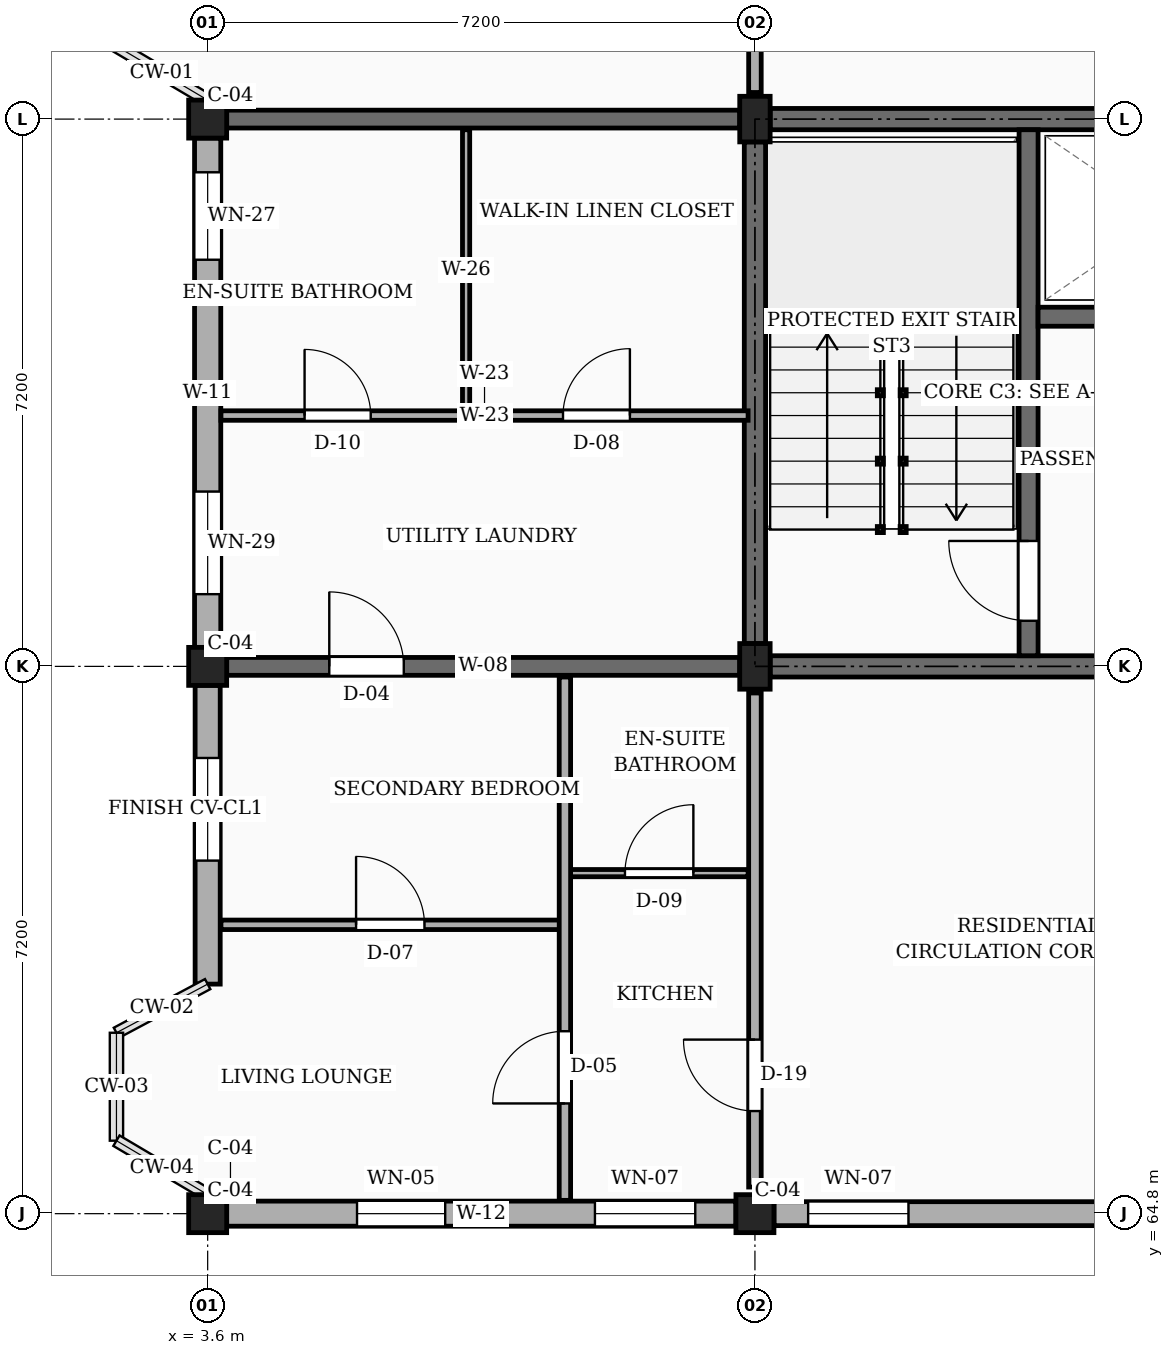
"""IFC4 building model, lengths in metres.
Left out: names, types, materials, properties, quantities, classifications, styles, units other than length and angle.
Written with IfcOpenShell. Run it as: python <this file> out.ifc"""

import sys

from ifc_helpers import new_model, si_unit, direction, frame, frame_2d, origin, origin_2d, place, context, subcontext, project, spatial, rectangle, extrude, element, fill, save


model = new_model("IFC4")
c1 = context("Model", 3, precision=1e-05, world=origin(), true_north=direction((0.0, 1.0)))
c2 = subcontext(c1, "Body", "Model", "MODEL_VIEW")
j1 = project(units=[si_unit("LENGTHUNIT", "METRE"), si_unit("PLANEANGLEUNIT", "RADIAN")], contexts=[c1])
p1 = place(None, origin())
s1 = spatial("IfcSite", under=j1, at=p1, CompositionType="ELEMENT")
p2 = place(p1, origin())
s2 = spatial("IfcBuilding", under=s1, at=p2, CompositionType="ELEMENT")
p3 = place(p2, frame((0.0, 0.0, 23.4)))
s3 = spatial("IfcBuildingStorey", under=s2, at=p3, CompositionType="ELEMENT", Elevation=23.4)
for number, where, z_axis, x_axis in (
    (1, (3.6, 64.8, 0.0), (0.0, 0.0, 1.0), (1.0, 0.0, 0.0)),
    (2, (3.6, 72.0, 0.0), (0.0, 0.0, 1.0), (1.0, 0.0, 0.0)),
    (3, (3.6, 79.2, 0.0), (0.0, 0.0, 1.0), (1.0, 0.0, 0.0)),
    (4, (10.8, 64.8, 0.0), (0.0, 0.0, 1.0), (1.0, 0.0, 0.0)),
):
    element("IfcColumn", number, at=place(p3, frame(where, z_axis=z_axis, x_axis=x_axis)), inside=s3, PredefinedType="COLUMN", context=c2, shape_type="SweptSolid", body=[
        extrude(rectangle(XDim=0.5, YDim=0.5, at=origin_2d()), origin(), (0.0, 0.0, 1.0), 3.15),
    ])
for number, where, z_axis, x_axis in (
    (5, (10.8, 72.0, 0.0), (0.0, 0.0, 1.0), (1.0, 0.0, 0.0)),
    (6, (10.8, 79.2, 0.0), (0.0, 0.0, 1.0), (1.0, 0.0, 0.0)),
):
    element("IfcColumn", number, at=place(p3, frame(where, z_axis=z_axis, x_axis=x_axis)), inside=s3, PredefinedType="COLUMN", context=c2, shape_type="SweptSolid", body=[
        extrude(rectangle(XDim=0.4, YDim=0.6, at=origin_2d()), origin(), (0.0, 0.0, 1.0), 3.15),
    ])
p4 = place(p3, frame((3.85, 72.0, 0.0), z_axis=(0.0, 0.0, 1.0), x_axis=(1.0, 0.0, 0.0)))
e7 = element("IfcWall", 7, at=p4, inside=s3, PredefinedType="SOLIDWALL", context=c2, shape_type="SweptSolid", body=[
    extrude(rectangle(XDim=6.75, YDim=0.235, at=frame_2d((3.375, 0.0))), origin(), (0.0, 0.0, 1.0), 2.21),
])
p5 = place(p4, frame((1.35, 0.0, 0.0)))
e8 = element("IfcOpeningElement", 8, at=p5, cuts=e7, PredefinedType="OPENING", context=c2, shape_type="SweptSolid", body=[
    extrude(rectangle(XDim=0.98, YDim=2.12, at=frame_2d((0.49, 1.06))), frame((0.0, 0.127, 0.0), z_axis=(0.0, -1.0, 0.0), x_axis=(1.0, 0.0, 0.0)), (0.0, 0.0, 1.0), 0.255),
])
p6 = place(p3, frame((3.85, 79.2, 0.0), z_axis=(0.0, 0.0, 1.0), x_axis=(1.0, 0.0, 0.0)))
e9 = element("IfcWall", 9, at=p6, inside=s3, PredefinedType="SOLIDWALL", context=c2, shape_type="SweptSolid", body=[
    extrude(rectangle(XDim=6.75, YDim=0.235, at=frame_2d((3.375, 0.0))), origin(), (0.0, 0.0, 1.0), 2.21),
])
p7 = place(p3, frame((3.85, 64.8, 0.0), z_axis=(0.0, 0.0, 1.0), x_axis=(1.0, 0.0, 0.0)))
e10 = element("IfcWall", 10, at=p7, inside=s3, PredefinedType="SOLIDWALL", context=c2, shape_type="SweptSolid", body=[
    extrude(rectangle(XDim=6.7, YDim=0.33, at=frame_2d((3.35, 0.0))), origin(), (0.0, 0.0, 1.0), 2.48),
])
p8 = place(p7, frame((1.715, 0.0, 0.78)))
e11 = element("IfcOpeningElement", 11, at=p8, cuts=e10, PredefinedType="OPENING", context=c2, shape_type="SweptSolid", body=[
    extrude(rectangle(XDim=1.16, YDim=1.15, at=frame_2d((0.58, 0.575))), frame((0.0, 0.175, 0.0), z_axis=(0.0, -1.0, 0.0), x_axis=(1.0, 0.0, 0.0)), (0.0, 0.0, 1.0), 0.35),
])
p9 = place(p7, frame((4.845, 0.0, 0.78)))
e12 = element("IfcOpeningElement", 12, at=p9, cuts=e10, PredefinedType="OPENING", context=c2, shape_type="SweptSolid", body=[
    extrude(rectangle(XDim=1.32, YDim=1.15, at=frame_2d((0.66, 0.575))), frame((0.0, 0.175, 0.0), z_axis=(0.0, -1.0, 0.0), x_axis=(1.0, 0.0, 0.0)), (0.0, 0.0, 1.0), 0.35),
])
p10 = place(p3, frame((11.05, 64.8, 0.0), z_axis=(0.0, 0.0, 1.0), x_axis=(1.0, 0.0, 0.0)))
e13 = element("IfcWall", 13, at=p10, inside=s3, PredefinedType="SOLIDWALL", context=c2, shape_type="SweptSolid", body=[
    extrude(rectangle(XDim=6.7, YDim=0.315, at=frame_2d((3.35, 0.0))), origin(), (0.0, 0.0, 1.0), 2.48),
])
p11 = place(p10, frame((0.45, 0.0, 0.78)))
e14 = element("IfcOpeningElement", 14, at=p11, cuts=e13, PredefinedType="OPENING", context=c2, shape_type="SweptSolid", body=[
    extrude(rectangle(XDim=1.32, YDim=1.15, at=frame_2d((0.66, 0.575))), frame((0.0, 0.167, 0.0), z_axis=(0.0, -1.0, 0.0), x_axis=(1.0, 0.0, 0.0)), (0.0, 0.0, 1.0), 0.335),
])
p12 = place(p10, frame((4.65, 0.0, 0.78)))
e15 = element("IfcOpeningElement", 15, at=p12, cuts=e13, PredefinedType="OPENING", context=c2, shape_type="SweptSolid", body=[
    extrude(rectangle(XDim=0.88, YDim=1.26, at=frame_2d((0.44, 0.63))), frame((0.0, 0.167, 0.0), z_axis=(0.0, -1.0, 0.0), x_axis=(1.0, 0.0, 0.0)), (0.0, 0.0, 1.0), 0.335),
])
p13 = place(p3, frame((3.6, 78.95, 0.0), z_axis=(0.0, 0.0, 1.0), x_axis=(0.0, -1.0, 0.0)))
e16 = element("IfcWall", 16, at=p13, inside=s3, PredefinedType="SOLIDWALL", context=c2, shape_type="SweptSolid", body=[
    extrude(rectangle(XDim=6.7, YDim=0.345, at=frame_2d((3.35, 0.0))), origin(), (0.0, 0.0, 1.0), 2.48),
])
p14 = place(p13, frame((0.45, 0.0, 0.78)))
e17 = element("IfcOpeningElement", 17, at=p14, cuts=e16, PredefinedType="OPENING", context=c2, shape_type="SweptSolid", body=[
    extrude(rectangle(XDim=1.15, YDim=1.44, at=frame_2d((0.575, 0.72))), frame((0.0, 0.183, 0.0), z_axis=(0.0, -1.0, 0.0), x_axis=(1.0, 0.0, 0.0)), (0.0, 0.0, 1.0), 0.365),
])
p15 = place(p13, frame((4.65, 0.0, 0.78)))
e18 = element("IfcOpeningElement", 18, at=p15, cuts=e16, PredefinedType="OPENING", context=c2, shape_type="SweptSolid", body=[
    extrude(rectangle(XDim=1.35, YDim=1.44, at=frame_2d((0.675, 0.72))), frame((0.0, 0.183, 0.0), z_axis=(0.0, -1.0, 0.0), x_axis=(1.0, 0.0, 0.0)), (0.0, 0.0, 1.0), 0.365),
])
p16 = place(p3, frame((3.6, 71.75, 0.0), z_axis=(0.0, 0.0, 1.0), x_axis=(0.0, -1.0, 0.0)))
e19 = element("IfcWall", 19, at=p16, inside=s3, PredefinedType="SOLIDWALL", context=c2, shape_type="SweptSolid", body=[
    extrude(rectangle(XDim=3.93, YDim=0.33, at=frame_2d((1.965, 0.0))), origin(), (0.0, 0.0, 1.0), 2.48),
])
p17 = place(p16, frame((0.955, 0.0, 0.78)))
e20 = element("IfcOpeningElement", 20, at=p17, cuts=e19, PredefinedType="OPENING", context=c2, shape_type="SweptSolid", body=[
    extrude(rectangle(XDim=1.35, YDim=1.44, at=frame_2d((0.675, 0.72))), frame((0.0, 0.175, 0.0), z_axis=(0.0, -1.0, 0.0), x_axis=(1.0, 0.0, 0.0)), (0.0, 0.0, 1.0), 0.35),
])
p18 = place(p3, frame((10.8, 72.3, 0.0), z_axis=(0.0, 0.0, 1.0), x_axis=(0.0, 1.0, 0.0)))
e21 = element("IfcWall", 21, at=p18, inside=s3, PredefinedType="SHEAR", context=c2, shape_type="SweptSolid", body=[
    extrude(rectangle(XDim=6.6, YDim=0.28, at=frame_2d((3.3, 0.0))), origin(), (0.0, 0.0, 1.0), 2.91),
])
for number, where, z_axis, x_axis in (
    (22, (11.0, 79.2, 0.0), (0.0, 0.0, 1.0), (1.0, 0.0, 0.0)),
    (23, (11.0, 72.0, 0.0), (0.0, 0.0, 1.0), (1.0, 0.0, 0.0)),
):
    element("IfcWall", number, at=place(p3, frame(where, z_axis=z_axis, x_axis=x_axis)), inside=s3, PredefinedType="SHEAR", context=c2, shape_type="SweptSolid", body=[
        extrude(rectangle(XDim=6.8, YDim=0.28, at=frame_2d((3.4, 0.0))), origin(), (0.0, 0.0, 1.0), 2.91),
    ])
p19 = place(p3, frame((14.4, 72.14, 0.0), z_axis=(0.0, 0.0, 1.0), x_axis=(0.0, 1.0, 0.0)))
e24 = element("IfcWall", 24, at=p19, inside=s3, PredefinedType="SHEAR", context=c2, shape_type="SweptSolid", body=[
    extrude(rectangle(XDim=6.92, YDim=0.25, at=frame_2d((3.46, 0.0))), origin(), (0.0, 0.0, 1.0), 2.91),
])
p20 = place(p19, frame((0.46, 0.0, 0.0)))
e25 = element("IfcOpeningElement", 25, at=p20, cuts=e24, PredefinedType="OPENING", context=c2, shape_type="SweptSolid", body=[
    extrude(rectangle(XDim=1.05, YDim=2.15, at=frame_2d((0.525, 1.075))), frame((0.0, 0.135, 0.0), z_axis=(0.0, -1.0, 0.0), x_axis=(1.0, 0.0, 0.0)), (0.0, 0.0, 1.0), 0.27),
])
p21 = place(p3, frame((14.525, 76.6, 0.0), z_axis=(0.0, 0.0, 1.0), x_axis=(1.0, 0.0, 0.0)))
e26 = element("IfcWall", 26, at=p21, inside=s3, PredefinedType="SHEAR", context=c2, shape_type="SweptSolid", body=[
    extrude(rectangle(XDim=3.335, YDim=0.25, at=frame_2d((1.667, 0.0))), origin(), (0.0, 0.0, 1.0), 2.91),
])
p22 = place(p21, frame((1.1, 0.0, 0.0)))
e27 = element("IfcOpeningElement", 27, at=p22, cuts=e26, PredefinedType="OPENING", context=c2, shape_type="SweptSolid", body=[
    extrude(rectangle(XDim=1.0, YDim=2.2, at=frame_2d((0.5, 1.1))), frame((0.0, 0.135, 0.0), z_axis=(0.0, -1.0, 0.0), x_axis=(1.0, 0.0, 0.0)), (0.0, 0.0, 1.0), 0.27),
])
p23 = place(p3, frame((10.8, 65.15, 0.0), z_axis=(0.0, 0.0, 1.0), x_axis=(0.0, 1.0, 0.0)))
e28 = element("IfcWall", 28, at=p23, inside=s3, PredefinedType="PARTITIONING", context=c2, shape_type="SweptSolid", body=[
    extrude(rectangle(XDim=6.5, YDim=0.165, at=frame_2d((3.25, 0.0))), origin(), (0.0, 0.0, 1.0), 2.345),
])
p24 = place(p23, frame((1.0, 0.0, 0.0)))
e29 = element("IfcOpeningElement", 29, at=p24, cuts=e28, PredefinedType="OPENING", context=c2, shape_type="SweptSolid", body=[
    extrude(rectangle(XDim=0.94, YDim=2.12, at=frame_2d((0.47, 1.06))), frame((0.0, 0.093, 0.0), z_axis=(0.0, -1.0, 0.0), x_axis=(1.0, 0.0, 0.0)), (0.0, 0.0, 1.0), 0.185),
])
p25 = place(p3, frame((10.8, 79.55, 0.0), z_axis=(0.0, 0.0, 1.0), x_axis=(0.0, 1.0, 0.0)))
e30 = element("IfcWall", 30, at=p25, inside=s3, PredefinedType="PARTITIONING", context=c2, shape_type="SweptSolid", body=[
    extrude(rectangle(XDim=6.5, YDim=0.165, at=frame_2d((3.25, 0.0))), origin(), (0.0, 0.0, 1.0), 2.345),
])
p26 = place(p25, frame((1.1, 0.0, 0.0)))
e31 = element("IfcOpeningElement", 31, at=p26, cuts=e30, PredefinedType="OPENING", context=c2, shape_type="SweptSolid", body=[
    extrude(rectangle(XDim=1.14, YDim=2.18, at=frame_2d((0.57, 1.09))), frame((0.0, 0.093, 0.0), z_axis=(0.0, -1.0, 0.0), x_axis=(1.0, 0.0, 0.0)), (0.0, 0.0, 1.0), 0.185),
])
p27 = place(p3, frame((3.775, 68.6, 0.0), z_axis=(0.0, 0.0, 1.0), x_axis=(1.0, 0.0, 0.0)))
e32 = element("IfcWall", 32, at=p27, inside=s3, PredefinedType="PARTITIONING", context=c2, shape_type="SweptSolid", body=[
    extrude(rectangle(XDim=4.455, YDim=0.125, at=frame_2d((2.228, 0.0))), origin(), (0.0, 0.0, 1.0), 2.345),
])
p28 = place(p27, frame((1.778, 0.0, 0.0)))
e33 = element("IfcOpeningElement", 33, at=p28, cuts=e32, PredefinedType="OPENING", context=c2, shape_type="SweptSolid", body=[
    extrude(rectangle(XDim=0.9, YDim=2.1, at=frame_2d((0.45, 1.05))), frame((0.0, 0.073, 0.0), z_axis=(0.0, -1.0, 0.0), x_axis=(1.0, 0.0, 0.0)), (0.0, 0.0, 1.0), 0.145),
])
p29 = place(p3, frame((8.37, 69.28, 0.0), z_axis=(0.0, 0.0, 1.0), x_axis=(1.0, 0.0, 0.0)))
e34 = element("IfcWall", 34, at=p29, inside=s3, PredefinedType="PARTITIONING", context=c2, shape_type="SweptSolid", body=[
    extrude(rectangle(XDim=2.34, YDim=0.095, at=frame_2d((1.17, 0.0))), origin(), (0.0, 0.0, 1.0), 2.345),
])
p30 = place(p29, frame((0.72, 0.0, 0.0)))
e35 = element("IfcOpeningElement", 35, at=p30, cuts=e34, PredefinedType="OPENING", context=c2, shape_type="SweptSolid", body=[
    extrude(rectangle(XDim=0.9, YDim=2.05, at=frame_2d((0.45, 1.025))), frame((0.0, 0.058, 0.0), z_axis=(0.0, -1.0, 0.0), x_axis=(1.0, 0.0, 0.0)), (0.0, 0.0, 1.0), 0.115),
])
p31 = place(p3, frame((8.3, 64.975, 0.0), z_axis=(0.0, 0.0, 1.0), x_axis=(0.0, 1.0, 0.0)))
e36 = element("IfcWall", 36, at=p31, inside=s3, PredefinedType="PARTITIONING", context=c2, shape_type="SweptSolid", body=[
    extrude(rectangle(XDim=6.885, YDim=0.15, at=frame_2d((3.442, 0.0))), origin(), (0.0, 0.0, 1.0), 2.345),
])
p32 = place(p31, frame((1.275, 0.0, 0.0)))
e37 = element("IfcOpeningElement", 37, at=p32, cuts=e36, PredefinedType="OPENING", context=c2, shape_type="SweptSolid", body=[
    extrude(rectangle(XDim=0.95, YDim=2.1, at=frame_2d((0.475, 1.05))), frame((0.0, 0.085, 0.0), z_axis=(0.0, -1.0, 0.0), x_axis=(1.0, 0.0, 0.0)), (0.0, 0.0, 1.0), 0.17),
])
p33 = place(p3, frame((3.775, 75.3, 0.0), z_axis=(0.0, 0.0, 1.0), x_axis=(1.0, 0.0, 0.0)))
e38 = element("IfcWall", 38, at=p33, inside=s3, PredefinedType="PARTITIONING", context=c2, shape_type="SweptSolid", body=[
    extrude(rectangle(XDim=6.935, YDim=0.125, at=frame_2d((3.468, 0.0))), origin(), (0.0, 0.0, 1.0), 2.345),
])
p34 = place(p33, frame((1.1, 0.0, 0.0)))
e39 = element("IfcOpeningElement", 39, at=p34, cuts=e38, PredefinedType="OPENING", context=c2, shape_type="SweptSolid", body=[
    extrude(rectangle(XDim=0.87, YDim=2.05, at=frame_2d((0.435, 1.025))), frame((0.0, 0.073, 0.0), z_axis=(0.0, -1.0, 0.0), x_axis=(1.0, 0.0, 0.0)), (0.0, 0.0, 1.0), 0.145),
])
p35 = place(p33, frame((4.5, 0.0, 0.0)))
e40 = element("IfcOpeningElement", 40, at=p35, cuts=e38, PredefinedType="OPENING", context=c2, shape_type="SweptSolid", body=[
    extrude(rectangle(XDim=0.88, YDim=2.08, at=frame_2d((0.44, 1.04))), frame((0.0, 0.073, 0.0), z_axis=(0.0, -1.0, 0.0), x_axis=(1.0, 0.0, 0.0)), (0.0, 0.0, 1.0), 0.145),
])
p36 = place(p3, frame((7.0, 75.37, 0.0), z_axis=(0.0, 0.0, 1.0), x_axis=(0.0, 1.0, 0.0)))
e41 = element("IfcWall", 41, at=p36, inside=s3, PredefinedType="PARTITIONING", context=c2, shape_type="SweptSolid", body=[
    extrude(rectangle(XDim=3.69, YDim=0.095, at=frame_2d((1.845, 0.0))), origin(), (0.0, 0.0, 1.0), 2.345),
])
p37 = place(p8, origin())
e42 = element("IfcWindow", 42, at=p37, inside=s3, PartitioningType="SINGLE_PANEL", PredefinedType="WINDOW", context=c2, shape_type="SweptSolid", body=[
    extrude(rectangle(XDim=1.16, YDim=1.15, at=frame_2d((0.58, 0.575))), frame((0.0, 0.03, 0.0), z_axis=(0.0, -1.0, 0.0), x_axis=(1.0, 0.0, 0.0)), (0.0, 0.0, 1.0), 0.06),
])
fill(e11, e42)
p38 = place(p9, origin())
e43 = element("IfcWindow", 43, at=p38, inside=s3, PartitioningType="SINGLE_PANEL", PredefinedType="WINDOW", context=c2, shape_type="SweptSolid", body=[
    extrude(rectangle(XDim=1.32, YDim=1.15, at=frame_2d((0.66, 0.575))), frame((0.0, 0.03, 0.0), z_axis=(0.0, -1.0, 0.0), x_axis=(1.0, 0.0, 0.0)), (0.0, 0.0, 1.0), 0.06),
])
fill(e12, e43)
p39 = place(p11, origin())
e44 = element("IfcWindow", 44, at=p39, inside=s3, PartitioningType="SINGLE_PANEL", PredefinedType="WINDOW", context=c2, shape_type="SweptSolid", body=[
    extrude(rectangle(XDim=1.32, YDim=1.15, at=frame_2d((0.66, 0.575))), frame((0.0, 0.03, 0.0), z_axis=(0.0, -1.0, 0.0), x_axis=(1.0, 0.0, 0.0)), (0.0, 0.0, 1.0), 0.06),
])
fill(e14, e44)
p40 = place(p14, origin())
e45 = element("IfcWindow", 45, at=p40, inside=s3, PartitioningType="SINGLE_PANEL", PredefinedType="WINDOW", context=c2, shape_type="SweptSolid", body=[
    extrude(rectangle(XDim=1.15, YDim=1.44, at=frame_2d((0.575, 0.72))), frame((0.0, 0.03, 0.0), z_axis=(0.0, -1.0, 0.0), x_axis=(1.0, 0.0, 0.0)), (0.0, 0.0, 1.0), 0.06),
])
fill(e17, e45)
p41 = place(p15, origin())
e46 = element("IfcWindow", 46, at=p41, inside=s3, PartitioningType="SINGLE_PANEL", PredefinedType="WINDOW", context=c2, shape_type="SweptSolid", body=[
    extrude(rectangle(XDim=1.35, YDim=1.44, at=frame_2d((0.675, 0.72))), frame((0.0, 0.03, 0.0), z_axis=(0.0, -1.0, 0.0), x_axis=(1.0, 0.0, 0.0)), (0.0, 0.0, 1.0), 0.06),
])
fill(e18, e46)
p42 = place(p17, origin())
e47 = element("IfcWindow", 47, at=p42, inside=s3, PartitioningType="SINGLE_PANEL", PredefinedType="WINDOW", context=c2, shape_type="SweptSolid", body=[
    extrude(rectangle(XDim=1.35, YDim=1.44, at=frame_2d((0.675, 0.72))), frame((0.0, 0.03, 0.0), z_axis=(0.0, -1.0, 0.0), x_axis=(1.0, 0.0, 0.0)), (0.0, 0.0, 1.0), 0.06),
])
fill(e20, e47)
p43 = place(p20, origin())
e48 = element("IfcDoor", 48, at=p43, inside=s3, OperationType="SINGLE_SWING_RIGHT", PredefinedType="DOOR", context=c2, shape_type="SweptSolid", body=[
    extrude(rectangle(XDim=1.05, YDim=2.15, at=frame_2d((0.525, 1.075))), frame((0.0, 0.025, 0.0), z_axis=(0.0, -1.0, 0.0), x_axis=(1.0, 0.0, 0.0)), (0.0, 0.0, 1.0), 0.05),
])
fill(e25, e48)
p44 = place(p24, origin())
e49 = element("IfcDoor", 49, at=p44, inside=s3, OperationType="SINGLE_SWING_RIGHT", PredefinedType="DOOR", context=c2, shape_type="SweptSolid", body=[
    extrude(rectangle(XDim=0.94, YDim=2.12, at=frame_2d((0.47, 1.06))), frame((0.0, 0.025, 0.0), z_axis=(0.0, -1.0, 0.0), x_axis=(1.0, 0.0, 0.0)), (0.0, 0.0, 1.0), 0.05),
])
fill(e29, e49)
p45 = place(p28, origin())
e50 = element("IfcDoor", 50, at=p45, inside=s3, OperationType="SINGLE_SWING_LEFT", PredefinedType="DOOR", context=c2, shape_type="SweptSolid", body=[
    extrude(rectangle(XDim=0.9, YDim=2.1, at=frame_2d((0.45, 1.05))), frame((0.0, 0.025, 0.0), z_axis=(0.0, -1.0, 0.0), x_axis=(1.0, 0.0, 0.0)), (0.0, 0.0, 1.0), 0.05),
])
fill(e33, e50)
p46 = place(p30, origin())
e51 = element("IfcDoor", 51, at=p46, inside=s3, OperationType="SINGLE_SWING_RIGHT", PredefinedType="DOOR", context=c2, shape_type="SweptSolid", body=[
    extrude(rectangle(XDim=0.9, YDim=2.05, at=frame_2d((0.45, 1.025))), frame((0.0, 0.025, 0.0), z_axis=(0.0, -1.0, 0.0), x_axis=(1.0, 0.0, 0.0)), (0.0, 0.0, 1.0), 0.05),
])
fill(e35, e51)
p47 = place(p32, origin())
e52 = element("IfcDoor", 52, at=p47, inside=s3, OperationType="SINGLE_SWING_LEFT", PredefinedType="DOOR", context=c2, shape_type="SweptSolid", body=[
    extrude(rectangle(XDim=0.95, YDim=2.1, at=frame_2d((0.475, 1.05))), frame((0.0, 0.025, 0.0), z_axis=(0.0, -1.0, 0.0), x_axis=(1.0, 0.0, 0.0)), (0.0, 0.0, 1.0), 0.05),
])
fill(e37, e52)
p48 = place(p34, origin())
e53 = element("IfcDoor", 53, at=p48, inside=s3, OperationType="SINGLE_SWING_LEFT", PredefinedType="DOOR", context=c2, shape_type="SweptSolid", body=[
    extrude(rectangle(XDim=0.87, YDim=2.05, at=frame_2d((0.435, 1.025))), frame((0.0, 0.025, 0.0), z_axis=(0.0, -1.0, 0.0), x_axis=(1.0, 0.0, 0.0)), (0.0, 0.0, 1.0), 0.05),
])
fill(e39, e53)
p49 = place(p35, origin())
e54 = element("IfcDoor", 54, at=p49, inside=s3, OperationType="SINGLE_SWING_RIGHT", PredefinedType="DOOR", context=c2, shape_type="SweptSolid", body=[
    extrude(rectangle(XDim=0.88, YDim=2.08, at=frame_2d((0.44, 1.04))), frame((0.0, 0.025, 0.0), z_axis=(0.0, -1.0, 0.0), x_axis=(1.0, 0.0, 0.0)), (0.0, 0.0, 1.0), 0.05),
])
fill(e40, e54)
p50 = place(p5, origin())
e55 = element("IfcDoor", 55, at=p50, inside=s3, OperationType="SINGLE_SWING_LEFT", PredefinedType="DOOR", context=c2, shape_type="SweptSolid", body=[
    extrude(rectangle(XDim=0.98, YDim=2.12, at=frame_2d((0.49, 1.06))), frame((0.0, 0.025, 0.0), z_axis=(0.0, -1.0, 0.0), x_axis=(1.0, 0.0, 0.0)), (0.0, 0.0, 1.0), 0.05),
])
fill(e8, e55)
save(model, sys.argv[1])
